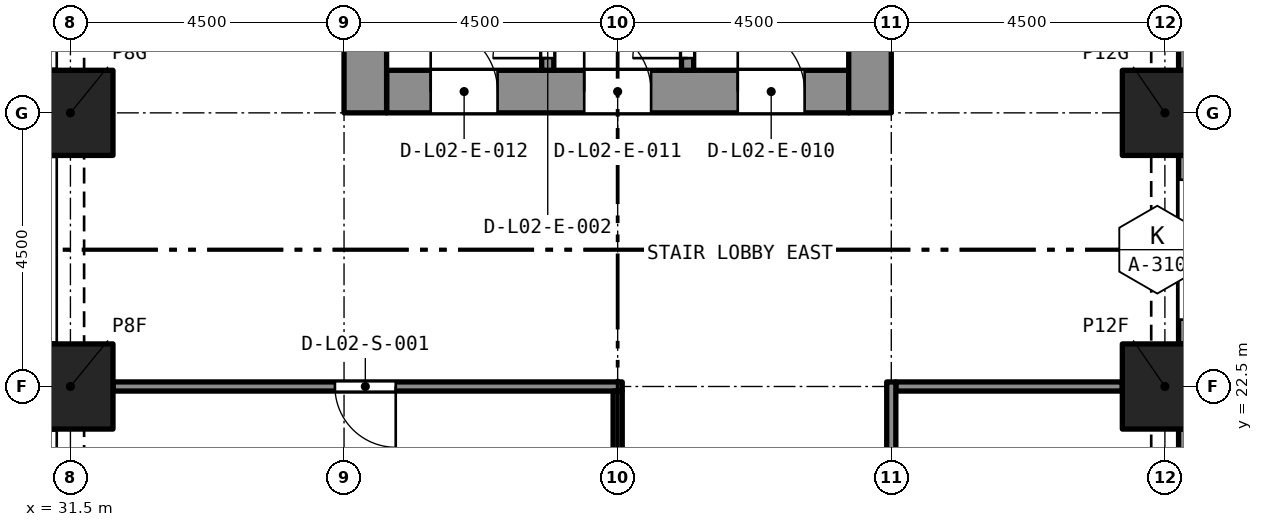
"""IFC4 building model, lengths in metres.
Left out: names, types, materials, properties, quantities, classifications, styles, units other than length and angle.
Written with IfcOpenShell. Run it as: python <this file> out.ifc"""

import sys

from ifc_helpers import new_model, si_unit, direction, frame, frame_2d, origin, origin_2d, place, context, subcontext, project, spatial, rectangle, extrude, element, fill, save


model = new_model("IFC4")
c1 = context("Model", 3, precision=1e-05, world=origin(), true_north=direction((0.0, 1.0)))
c2 = subcontext(c1, "Body", "Model", "MODEL_VIEW")
j1 = project(units=[si_unit("LENGTHUNIT", "METRE"), si_unit("PLANEANGLEUNIT", "RADIAN")], contexts=[c1])
p1 = place(None, origin())
s1 = spatial("IfcSite", under=j1, at=p1, CompositionType="ELEMENT")
p2 = place(p1, origin())
s2 = spatial("IfcBuilding", under=s1, at=p2, CompositionType="ELEMENT")
p3 = place(p2, frame((0.0, 0.0, 11.0)))
s3 = spatial("IfcBuildingStorey", under=s2, at=p3, CompositionType="ELEMENT", Elevation=11.0)
for number, where, z_axis, x_axis in (
    (1, (31.5, 22.5, 0.0), (0.0, 0.0, 1.0), (1.0, 0.0, 0.0)),
    (2, (49.5, 22.5, 0.0), (0.0, 0.0, 1.0), (1.0, 0.0, 0.0)),
    (3, (31.5, 27.0, 0.0), (0.0, 0.0, 1.0), (1.0, 0.0, 0.0)),
    (4, (49.5, 27.0, 0.0), (0.0, 0.0, 1.0), (1.0, 0.0, 0.0)),
):
    element("IfcColumn", number, at=place(p3, frame(where, z_axis=z_axis, x_axis=x_axis)), inside=s3, PredefinedType="COLUMN", context=c2, shape_type="SweptSolid", body=[
        extrude(rectangle(XDim=1.4, YDim=1.4, at=origin_2d()), origin(), (0.0, 0.0, 1.0), 5.0),
    ])
p4 = place(p3, frame((36.7, 27.35, 0.0), z_axis=(0.0, 0.0, 1.0), x_axis=(1.0, 0.0, 0.0)))
e5 = element("IfcWall", 5, at=p4, inside=s3, PredefinedType="SOLIDWALL", context=c2, shape_type="SweptSolid", body=[
    extrude(rectangle(XDim=7.6, YDim=0.7, at=frame_2d((3.8, 0.0))), origin(), (0.0, 0.0, 1.0), 5.0),
])
p5 = place(p4, frame((5.775, 0.0, 0.0)))
e6 = element("IfcOpeningElement", 6, at=p5, cuts=e5, PredefinedType="OPENING", context=c2, shape_type="SweptSolid", body=[
    extrude(rectangle(XDim=1.1, YDim=2.1, at=frame_2d((0.55, 1.05))), frame((0.0, 0.36, 0.0), z_axis=(0.0, -1.0, 0.0), x_axis=(1.0, 0.0, 0.0)), (0.0, 0.0, 1.0), 0.72),
])
p6 = place(p4, frame((3.25, 0.0, 0.0)))
e7 = element("IfcOpeningElement", 7, at=p6, cuts=e5, PredefinedType="OPENING", context=c2, shape_type="SweptSolid", body=[
    extrude(rectangle(XDim=1.1, YDim=2.1, at=frame_2d((0.55, 1.05))), frame((0.0, 0.36, 0.0), z_axis=(0.0, -1.0, 0.0), x_axis=(1.0, 0.0, 0.0)), (0.0, 0.0, 1.0), 0.72),
])
p7 = place(p4, frame((0.725, 0.0, 0.0)))
e8 = element("IfcOpeningElement", 8, at=p7, cuts=e5, PredefinedType="OPENING", context=c2, shape_type="SweptSolid", body=[
    extrude(rectangle(XDim=1.1, YDim=2.1, at=frame_2d((0.55, 1.05))), frame((0.0, 0.36, 0.0), z_axis=(0.0, -1.0, 0.0), x_axis=(1.0, 0.0, 0.0)), (0.0, 0.0, 1.0), 0.72),
])
p8 = place(p3, frame((36.35, 27.0, 0.0), z_axis=(0.0, 0.0, 1.0), x_axis=(0.0, 1.0, 0.0)))
e9 = element("IfcWall", 9, at=p8, inside=s3, PredefinedType="SOLIDWALL", context=c2, shape_type="SweptSolid", body=[
    extrude(rectangle(XDim=13.5, YDim=0.7, at=frame_2d((6.75, 0.0))), origin(), (0.0, 0.0, 1.0), 5.0),
])
p9 = place(p8, frame((8.95, 0.0, 0.0)))
e10 = element("IfcOpeningElement", 10, at=p9, cuts=e9, PredefinedType="OPENING", context=c2, shape_type="SweptSolid", body=[
    extrude(rectangle(XDim=1.2, YDim=2.1, at=frame_2d((0.6, 1.05))), frame((0.0, 0.36, 0.0), z_axis=(0.0, -1.0, 0.0), x_axis=(1.0, 0.0, 0.0)), (0.0, 0.0, 1.0), 0.72),
])
p10 = place(p3, frame((44.65, 27.0, 0.0), z_axis=(0.0, 0.0, 1.0), x_axis=(0.0, 1.0, 0.0)))
e11 = element("IfcWall", 11, at=p10, inside=s3, PredefinedType="SOLIDWALL", context=c2, shape_type="SweptSolid", body=[
    extrude(rectangle(XDim=13.5, YDim=0.7, at=frame_2d((6.75, 0.0))), origin(), (0.0, 0.0, 1.0), 5.0),
])
p11 = place(p10, frame((8.95, 0.0, 0.0)))
e12 = element("IfcOpeningElement", 12, at=p11, cuts=e11, PredefinedType="OPENING", context=c2, shape_type="SweptSolid", body=[
    extrude(rectangle(XDim=1.2, YDim=2.1, at=frame_2d((0.6, 1.05))), frame((0.0, 0.36, 0.0), z_axis=(0.0, -1.0, 0.0), x_axis=(1.0, 0.0, 0.0)), (0.0, 0.0, 1.0), 0.72),
])
p12 = place(p3, frame((49.875, 21.8, 0.0), z_axis=(0.0, 0.0, 1.0), x_axis=(0.0, -1.0, 0.0)))
e13 = element("IfcWall", 13, at=p12, inside=s3, PredefinedType="SOLIDWALL", context=c2, shape_type="SweptSolid", body=[
    extrude(rectangle(XDim=3.1, YDim=0.3, at=frame_2d((1.55, 0.0))), origin(), (0.0, 0.0, 1.0), 5.0),
])
p13 = place(p12, frame((0.4, 0.0, 0.45)))
e14 = element("IfcOpeningElement", 14, at=p13, cuts=e13, PredefinedType="OPENING", context=c2, shape_type="SweptSolid", body=[
    extrude(rectangle(XDim=2.3, YDim=3.3, at=frame_2d((1.15, 1.65))), frame((0.0, 0.16, 0.0), z_axis=(0.0, -1.0, 0.0), x_axis=(1.0, 0.0, 0.0)), (0.0, 0.0, 1.0), 0.32),
])
p14 = place(p3, frame((49.875, 26.3, 0.0), z_axis=(0.0, 0.0, 1.0), x_axis=(0.0, -1.0, 0.0)))
e15 = element("IfcWall", 15, at=p14, inside=s3, PredefinedType="SOLIDWALL", context=c2, shape_type="SweptSolid", body=[
    extrude(rectangle(XDim=3.1, YDim=0.3, at=frame_2d((1.55, 0.0))), origin(), (0.0, 0.0, 1.0), 5.0),
])
p15 = place(p14, frame((0.4, 0.0, 0.45)))
e16 = element("IfcOpeningElement", 16, at=p15, cuts=e15, PredefinedType="OPENING", context=c2, shape_type="SweptSolid", body=[
    extrude(rectangle(XDim=2.3, YDim=3.3, at=frame_2d((1.15, 1.65))), frame((0.0, 0.16, 0.0), z_axis=(0.0, -1.0, 0.0), x_axis=(1.0, 0.0, 0.0)), (0.0, 0.0, 1.0), 0.32),
])
p16 = place(p3, frame((49.875, 30.8, 0.0), z_axis=(0.0, 0.0, 1.0), x_axis=(0.0, -1.0, 0.0)))
e17 = element("IfcWall", 17, at=p16, inside=s3, PredefinedType="SOLIDWALL", context=c2, shape_type="SweptSolid", body=[
    extrude(rectangle(XDim=3.1, YDim=0.3, at=frame_2d((1.55, 0.0))), origin(), (0.0, 0.0, 1.0), 5.0),
])
p17 = place(p16, frame((0.4, 0.0, 0.45)))
e18 = element("IfcOpeningElement", 18, at=p17, cuts=e17, PredefinedType="OPENING", context=c2, shape_type="SweptSolid", body=[
    extrude(rectangle(XDim=2.3, YDim=3.3, at=frame_2d((1.15, 1.65))), frame((0.0, 0.16, 0.0), z_axis=(0.0, -1.0, 0.0), x_axis=(1.0, 0.0, 0.0)), (0.0, 0.0, 1.0), 0.32),
])
p18 = place(p3, frame((41.65, 27.7, 0.0), z_axis=(0.0, 0.0, 1.0), x_axis=(0.0, 1.0, 0.0)))
e19 = element("IfcWall", 19, at=p18, inside=s3, PredefinedType="SOLIDWALL", context=c2, shape_type="SweptSolid", body=[
    extrude(rectangle(XDim=5.4, YDim=0.2, at=frame_2d((2.7, 0.0))), origin(), (0.0, 0.0, 1.0), 4.65),
])
p19 = place(p18, frame((0.2, 0.0, 0.0)))
e20 = element("IfcOpeningElement", 20, at=p19, cuts=e19, PredefinedType="OPENING", context=c2, shape_type="SweptSolid", body=[
    extrude(rectangle(XDim=0.9, YDim=2.1, at=frame_2d((0.45, 1.05))), frame((0.0, 0.11, 0.0), z_axis=(0.0, -1.0, 0.0), x_axis=(1.0, 0.0, 0.0)), (0.0, 0.0, 1.0), 0.22),
])
p20 = place(p3, frame((39.35, 27.7, 0.0), z_axis=(0.0, 0.0, 1.0), x_axis=(0.0, 1.0, 0.0)))
e21 = element("IfcWall", 21, at=p20, inside=s3, PredefinedType="SOLIDWALL", context=c2, shape_type="SweptSolid", body=[
    extrude(rectangle(XDim=5.4, YDim=0.2, at=frame_2d((2.7, 0.0))), origin(), (0.0, 0.0, 1.0), 4.65),
])
p21 = place(p20, frame((0.2, 0.0, 0.0)))
e22 = element("IfcOpeningElement", 22, at=p21, cuts=e21, PredefinedType="OPENING", context=c2, shape_type="SweptSolid", body=[
    extrude(rectangle(XDim=0.9, YDim=2.1, at=frame_2d((0.45, 1.05))), frame((0.0, 0.11, 0.0), z_axis=(0.0, -1.0, 0.0), x_axis=(1.0, 0.0, 0.0)), (0.0, 0.0, 1.0), 0.22),
])
p22 = place(p3, frame((40.575, 22.5, 0.0), z_axis=(0.0, 0.0, 1.0), x_axis=(-1.0, 0.0, 0.0)))
e23 = element("IfcWall", 23, at=p22, inside=s3, PredefinedType="PARTITIONING", context=c2, shape_type="SweptSolid", body=[
    extrude(rectangle(XDim=8.375, YDim=0.15, at=frame_2d((4.188, 0.0))), origin(), (0.0, 0.0, 1.0), 4.65),
])
p23 = place(p22, frame((3.725, 0.0, 0.0)))
e24 = element("IfcOpeningElement", 24, at=p23, cuts=e23, PredefinedType="OPENING", context=c2, shape_type="SweptSolid", body=[
    extrude(rectangle(XDim=1.0, YDim=2.1, at=frame_2d((0.5, 1.05))), frame((0.0, 0.085, 0.0), z_axis=(0.0, -1.0, 0.0), x_axis=(1.0, 0.0, 0.0)), (0.0, 0.0, 1.0), 0.17),
])
p24 = place(p3, frame((45.075, 22.5, 0.0), z_axis=(0.0, 0.0, 1.0), x_axis=(1.0, 0.0, 0.0)))
e25 = element("IfcWall", 25, at=p24, inside=s3, PredefinedType="PARTITIONING", context=c2, shape_type="SweptSolid", body=[
    extrude(rectangle(XDim=3.725, YDim=0.15, at=frame_2d((1.863, 0.0))), origin(), (0.0, 0.0, 1.0), 4.65),
])
p25 = place(p3, frame((40.5, 13.5, 0.0), z_axis=(0.0, 0.0, 1.0), x_axis=(0.0, 1.0, 0.0)))
e26 = element("IfcWall", 26, at=p25, inside=s3, PredefinedType="PARTITIONING", context=c2, shape_type="SweptSolid", body=[
    extrude(rectangle(XDim=8.925, YDim=0.15, at=frame_2d((4.462, 0.0))), origin(), (0.0, 0.0, 1.0), 4.65),
])
p26 = place(p25, frame((4.0, 0.0, 0.0)))
e27 = element("IfcOpeningElement", 27, at=p26, cuts=e26, PredefinedType="OPENING", context=c2, shape_type="SweptSolid", body=[
    extrude(rectangle(XDim=1.0, YDim=2.1, at=frame_2d((0.5, 1.05))), frame((0.0, 0.085, 0.0), z_axis=(0.0, -1.0, 0.0), x_axis=(1.0, 0.0, 0.0)), (0.0, 0.0, 1.0), 0.17),
])
p27 = place(p3, frame((45.0, 22.575, 0.0), z_axis=(0.0, 0.0, 1.0), x_axis=(0.0, -1.0, 0.0)))
e28 = element("IfcWall", 28, at=p27, inside=s3, PredefinedType="PARTITIONING", context=c2, shape_type="SweptSolid", body=[
    extrude(rectangle(XDim=9.075, YDim=0.15, at=frame_2d((4.538, 0.0))), origin(), (0.0, 0.0, 1.0), 4.65),
])
p28 = place(p27, frame((4.175, 0.0, 0.0)))
e29 = element("IfcOpeningElement", 29, at=p28, cuts=e28, PredefinedType="OPENING", context=c2, shape_type="SweptSolid", body=[
    extrude(rectangle(XDim=0.8, YDim=2.1, at=frame_2d((0.4, 1.05))), frame((0.0, 0.085, 0.0), z_axis=(0.0, -1.0, 0.0), x_axis=(1.0, 0.0, 0.0)), (0.0, 0.0, 1.0), 0.17),
])
p29 = place(p19, origin())
e30 = element("IfcDoor", 30, at=p29, inside=s3, OperationType="SINGLE_SWING_LEFT", PredefinedType="DOOR", context=c2, shape_type="SweptSolid", body=[
    extrude(rectangle(XDim=0.9, YDim=2.1, at=frame_2d((0.45, 1.05))), frame((0.0, 0.025, 0.0), z_axis=(0.0, -1.0, 0.0), x_axis=(1.0, 0.0, 0.0)), (0.0, 0.0, 1.0), 0.05),
])
fill(e20, e30)
p30 = place(p21, origin())
e31 = element("IfcDoor", 31, at=p30, inside=s3, OperationType="SINGLE_SWING_LEFT", PredefinedType="DOOR", context=c2, shape_type="SweptSolid", body=[
    extrude(rectangle(XDim=0.9, YDim=2.1, at=frame_2d((0.45, 1.05))), frame((0.0, 0.025, 0.0), z_axis=(0.0, -1.0, 0.0), x_axis=(1.0, 0.0, 0.0)), (0.0, 0.0, 1.0), 0.05),
])
fill(e22, e31)
p31 = place(p5, origin())
e32 = element("IfcDoor", 32, at=p31, inside=s3, OperationType="SINGLE_SWING_LEFT", PredefinedType="DOOR", context=c2, shape_type="SweptSolid", body=[
    extrude(rectangle(XDim=1.1, YDim=2.1, at=frame_2d((0.55, 1.05))), frame((0.0, 0.025, 0.0), z_axis=(0.0, -1.0, 0.0), x_axis=(1.0, 0.0, 0.0)), (0.0, 0.0, 1.0), 0.05),
])
fill(e6, e32)
p32 = place(p6, origin())
e33 = element("IfcDoor", 33, at=p32, inside=s3, OperationType="SINGLE_SWING_LEFT", PredefinedType="DOOR", context=c2, shape_type="SweptSolid", body=[
    extrude(rectangle(XDim=1.1, YDim=2.1, at=frame_2d((0.55, 1.05))), frame((0.0, 0.025, 0.0), z_axis=(0.0, -1.0, 0.0), x_axis=(1.0, 0.0, 0.0)), (0.0, 0.0, 1.0), 0.05),
])
fill(e7, e33)
p33 = place(p7, origin())
e34 = element("IfcDoor", 34, at=p33, inside=s3, OperationType="SINGLE_SWING_LEFT", PredefinedType="DOOR", context=c2, shape_type="SweptSolid", body=[
    extrude(rectangle(XDim=1.1, YDim=2.1, at=frame_2d((0.55, 1.05))), frame((0.0, 0.025, 0.0), z_axis=(0.0, -1.0, 0.0), x_axis=(1.0, 0.0, 0.0)), (0.0, 0.0, 1.0), 0.05),
])
fill(e8, e34)
p34 = place(p23, origin())
e35 = element("IfcDoor", 35, at=p34, inside=s3, OperationType="SINGLE_SWING_RIGHT", PredefinedType="DOOR", context=c2, shape_type="SweptSolid", body=[
    extrude(rectangle(XDim=1.0, YDim=2.1, at=frame_2d((0.5, 1.05))), frame((0.0, 0.025, 0.0), z_axis=(0.0, -1.0, 0.0), x_axis=(1.0, 0.0, 0.0)), (0.0, 0.0, 1.0), 0.05),
])
fill(e24, e35)
save(model, sys.argv[1])
